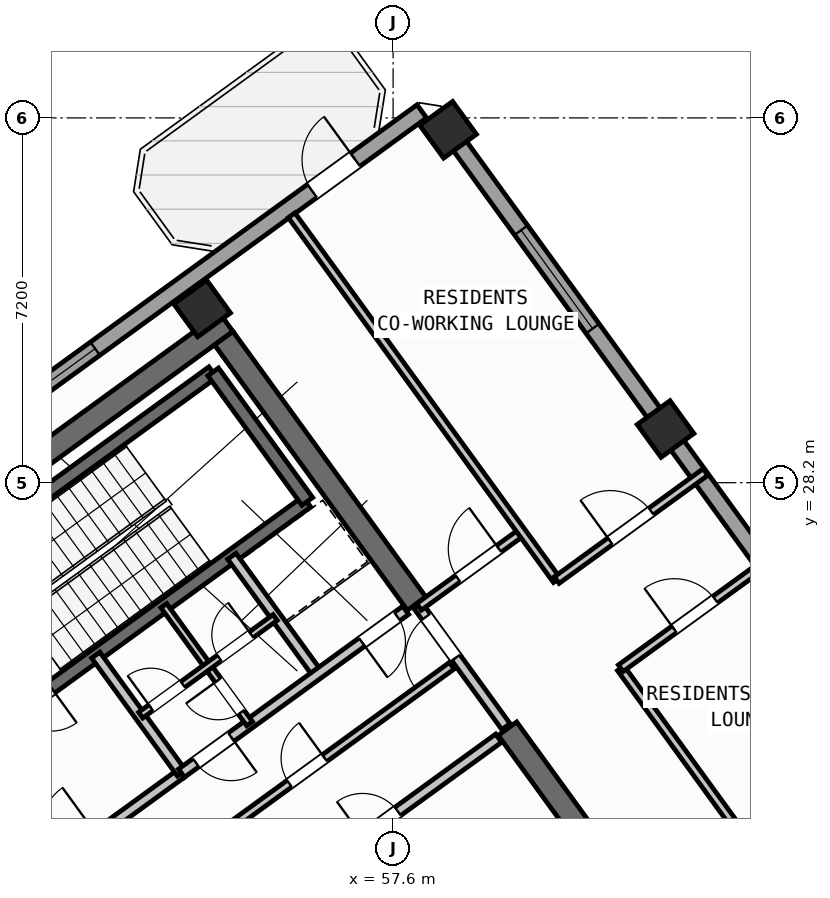
"""IFC4 building model, lengths in metres.
Left out: names, types, materials, properties, quantities, classifications, styles, units other than length and angle.
Written with IfcOpenShell. Run it as: python <this file> out.ifc"""

import sys

from ifc_helpers import new_model, si_unit, direction, frame, frame_2d, origin, origin_2d, place, context, subcontext, project, spatial, rectangle, hollow_rectangle, extrude, source, transform, mapped, element, fill, save


model = new_model("IFC4")
c1 = context("Model", 3, precision=1e-05, world=origin(), true_north=direction((0.0, 1.0)))
c2 = subcontext(c1, "Body", "Model", "MODEL_VIEW")
j1 = project(units=[si_unit("LENGTHUNIT", "METRE"), si_unit("PLANEANGLEUNIT", "RADIAN")], contexts=[c1])
p1 = place(None, origin())
s1 = spatial("IfcSite", under=j1, at=p1, CompositionType="ELEMENT")
p2 = place(p1, origin())
s2 = spatial("IfcBuilding", under=s1, at=p2, CompositionType="ELEMENT")
p3 = place(p2, frame((0.0, 0.0, 233.7)))
s3 = spatial("IfcBuildingStorey", under=s2, at=p3, CompositionType="ELEMENT", Elevation=233.7)
p4 = place(p3, frame((44.406, 24.172, 0.0), z_axis=(0.0, 0.0, 1.0), x_axis=(0.809012867805, 0.587790931986, 0.0)))
e1 = element("IfcWall", 1, at=p4, inside=s3, PredefinedType="SHEAR", context=c2, shape_type="SweptSolid", body=[
    extrude(rectangle(XDim=12.24, YDim=0.45, at=frame_2d((6.12, 0.0))), origin(), (0.0, 0.0, 1.0), 4.55),
])
p5 = place(p3, frame((61.988, 20.413, 0.0), z_axis=(0.0, 0.0, 1.0), x_axis=(-0.587819244441, 0.808992296542, 0.0)))
e2 = element("IfcWall", 2, at=p5, inside=s3, PredefinedType="SHEAR", context=c2, shape_type="SweptSolid", body=[
    extrude(rectangle(XDim=3.625, YDim=0.45, at=frame_2d((1.812, 0.0))), origin(), (0.0, 0.0, 1.0), 4.55),
])
p6 = place(p3, frame((58.064, 25.813, 0.0), z_axis=(0.0, 0.0, 1.0), x_axis=(-0.587774812919, 0.809024578921, 0.0)))
e3 = element("IfcWall", 3, at=p6, inside=s3, PredefinedType="SHEAR", context=c2, shape_type="SweptSolid", body=[
    extrude(rectangle(XDim=6.475, YDim=0.45, at=frame_2d((3.238, 0.0))), origin(), (0.0, 0.0, 1.0), 4.55),
])
m1 = source(origin(), c2, "Body", "SweptSolid", [
    extrude(hollow_rectangle(XDim=0.8, YDim=0.8, WallThickness=0.032, at=origin_2d()), origin(), (0.0, 0.0, 1.0), 4.8),
])
for number, where, z_axis, x_axis in (
    (4, (53.832, 31.638, 0.0), (0.0, 0.0, 1.0), (0.809, 0.588, 0.0)),
    (5, (62.977, 29.259, 0.0), (0.0, 0.0, 1.0), (0.809, 0.588, 0.0)),
    (6, (58.686, 35.165, 0.0), (0.0, 0.0, 1.0), (0.809, 0.588, 0.0)),
):
    element("IfcColumn", number, at=place(p3, frame(where, z_axis=z_axis, x_axis=x_axis)), inside=s3, PredefinedType="COLUMN", context=c2, shape_type="MappedRepresentation", body=[
        mapped(m1, transform((0.0, 0.0, 0.0), scale=1.0)),
    ])
p7 = place(p3, frame((43.938, 25.192, 0.0), z_axis=(0.0, 0.0, 1.0), x_axis=(0.809016324578, 0.587786174187, 0.0)))
e7 = element("IfcWall", 7, at=p7, inside=s3, PredefinedType="STANDARD", context=c2, shape_type="SweptSolid", body=[
    extrude(rectangle(XDim=17.587, YDim=0.32, at=frame_2d((8.794, 0.0))), origin(), (0.0, 0.0, 1.0), 4.55),
])
p8 = place(p7, frame((14.914, 0.0, 0.0)))
e8 = element("IfcOpeningElement", 8, at=p8, cuts=e7, PredefinedType="OPENING", context=c2, shape_type="SweptSolid", body=[
    extrude(rectangle(XDim=1.05, YDim=2.15, at=frame_2d((0.525, 1.075))), frame((0.0, 0.17, 0.0), z_axis=(0.0, -1.0, 0.0), x_axis=(1.0, 0.0, 0.0)), (0.0, 0.0, 1.0), 0.34),
])
p9 = place(p7, frame((1.969, 0.0, 0.75)))
e9 = element("IfcOpeningElement", 9, at=p9, cuts=e7, PredefinedType="OPENING", context=c2, shape_type="SweptSolid", body=[
    extrude(rectangle(XDim=2.4, YDim=1.6, at=frame_2d((1.2, 0.8))), frame((0.0, 0.17, 0.0), z_axis=(0.0, -1.0, 0.0), x_axis=(1.0, 0.0, 0.0)), (0.0, 0.0, 1.0), 0.34),
])
p10 = place(p7, frame((7.219, 0.0, 0.75)))
e10 = element("IfcOpeningElement", 10, at=p10, cuts=e7, PredefinedType="OPENING", context=c2, shape_type="SweptSolid", body=[
    extrude(rectangle(XDim=2.4, YDim=1.6, at=frame_2d((1.2, 0.8))), frame((0.0, 0.17, 0.0), z_axis=(0.0, -1.0, 0.0), x_axis=(1.0, 0.0, 0.0)), (0.0, 0.0, 1.0), 0.34),
])
p11 = place(p3, frame((58.455, 35.484, 0.0), z_axis=(0.0, 0.0, 1.0), x_axis=(0.587783625747, -0.809018176127, 0.0)))
e11 = element("IfcWall", 11, at=p11, inside=s3, PredefinedType="STANDARD", context=c2, shape_type="SweptSolid", body=[
    extrude(rectangle(XDim=21.587, YDim=0.32, at=frame_2d((10.794, 0.0))), origin(), (0.0, 0.0, 1.0), 4.075),
])
p12 = place(p11, frame((2.844, 0.0, 0.75)))
e12 = element("IfcOpeningElement", 12, at=p12, cuts=e11, PredefinedType="OPENING", context=c2, shape_type="SweptSolid", body=[
    extrude(rectangle(XDim=2.4, YDim=1.6, at=frame_2d((1.2, 0.8))), frame((0.0, 0.17, 0.0), z_axis=(0.0, -1.0, 0.0), x_axis=(1.0, 0.0, 0.0)), (0.0, 0.0, 1.0), 0.34),
])
p13 = place(p11, frame((11.967, 0.0, 0.85)))
e13 = element("IfcOpeningElement", 13, at=p13, cuts=e11, PredefinedType="OPENING", context=c2, shape_type="SweptSolid", body=[
    extrude(rectangle(XDim=1.8, YDim=1.5, at=frame_2d((0.9, 0.75))), frame((0.0, 0.17, 0.0), z_axis=(0.0, -1.0, 0.0), x_axis=(1.0, 0.0, 0.0)), (0.0, 0.0, 1.0), 0.34),
])
p14 = place(p3, frame((48.006, 25.996, 0.0), z_axis=(0.0, 0.0, 1.0), x_axis=(0.80901903764, 0.587782439969, 0.0)))
e14 = element("IfcWall", 14, at=p14, inside=s3, PredefinedType="SHEAR", context=c2, shape_type="SweptSolid", body=[
    extrude(rectangle(XDim=7.46, YDim=0.26, at=frame_2d((3.73, 0.0))), origin(), (0.0, 0.0, 1.0), 4.55),
])
p15 = place(p3, frame((49.863, 23.44, 0.0), z_axis=(0.0, 0.0, 1.0), x_axis=(0.809003474932, 0.587803859759, 0.0)))
e15 = element("IfcWall", 15, at=p15, inside=s3, PredefinedType="SHEAR", context=c2, shape_type="SweptSolid", body=[
    extrude(rectangle(XDim=7.46, YDim=0.26, at=frame_2d((3.73, 0.0))), origin(), (0.0, 0.0, 1.0), 4.55),
])
p16 = place(p15, frame((0.36, 0.0, 0.0)))
e16 = element("IfcOpeningElement", 16, at=p16, cuts=e15, PredefinedType="OPENING", context=c2, shape_type="SweptSolid", body=[
    extrude(rectangle(XDim=0.86, YDim=2.05, at=frame_2d((0.43, 1.025))), frame((0.0, 0.14, 0.0), z_axis=(0.0, -1.0, 0.0), x_axis=(1.0, 0.0, 0.0)), (0.0, 0.0, 1.0), 0.28),
])
p17 = place(p3, frame((55.906, 27.831, 0.0), z_axis=(0.0, 0.0, 1.0), x_axis=(-0.587804123638, 0.809003283204, 0.0)))
e17 = element("IfcWall", 17, at=p17, inside=s3, PredefinedType="SHEAR", context=c2, shape_type="SweptSolid", body=[
    extrude(rectangle(XDim=3.16, YDim=0.26, at=frame_2d((1.58, 0.0))), origin(), (0.0, 0.0, 1.0), 4.55),
])
p18 = place(p3, frame((48.718, 19.048, 0.0), z_axis=(0.0, 0.0, 1.0), x_axis=(0.809017261719, 0.587784884325, 0.0)))
e18 = element("IfcWall", 18, at=p18, inside=s3, PredefinedType="STANDARD", context=c2, shape_type="SweptSolid", body=[
    extrude(rectangle(XDim=5.818, YDim=0.2, at=frame_2d((2.909, 0.0))), origin(), (0.0, 0.0, 1.0), 4.54),
])
p19 = place(p18, frame((2.598, 0.0, 0.0)))
e19 = element("IfcOpeningElement", 19, at=p19, cuts=e18, PredefinedType="OPENING", context=c2, shape_type="SweptSolid", body=[
    extrude(rectangle(XDim=1.15, YDim=2.1, at=frame_2d((0.575, 1.05))), frame((0.0, 0.11, 0.0), z_axis=(0.0, -1.0, 0.0), x_axis=(1.0, 0.0, 0.0)), (0.0, 0.0, 1.0), 0.22),
])
p20 = place(p3, frame((56.553, 20.884, 0.0), z_axis=(0.0, 0.0, 1.0), x_axis=(0.809041669066, 0.587751288995, 0.0)))
e20 = element("IfcWall", 20, at=p20, inside=s3, PredefinedType="STANDARD", context=c2, shape_type="SweptSolid", body=[
    extrude(rectangle(XDim=3.868, YDim=0.2, at=frame_2d((1.934, 0.0))), origin(), (0.0, 0.0, 1.0), 4.54),
])
p21 = place(p20, frame((0.55, 0.0, 0.0)))
e21 = element("IfcOpeningElement", 21, at=p21, cuts=e20, PredefinedType="OPENING", context=c2, shape_type="SweptSolid", body=[
    extrude(rectangle(XDim=0.86, YDim=2.05, at=frame_2d((0.43, 1.025))), frame((0.0, 0.11, 0.0), z_axis=(0.0, -1.0, 0.0), x_axis=(1.0, 0.0, 0.0)), (0.0, 0.0, 1.0), 0.22),
])
p22 = place(p3, frame((54.421, 21.436, 0.0), z_axis=(0.0, 0.0, 1.0), x_axis=(0.809013710463, 0.587789772183, 0.0)))
e22 = element("IfcWall", 22, at=p22, inside=s3, PredefinedType="PARTITIONING", context=c2, shape_type="SweptSolid", body=[
    extrude(rectangle(XDim=5.36, YDim=0.16, at=frame_2d((2.68, 0.0))), origin(), (0.0, 0.0, 1.0), 4.54),
])
p23 = place(p22, frame((1.4, 0.0, 0.0)))
e23 = element("IfcOpeningElement", 23, at=p23, cuts=e22, PredefinedType="OPENING", context=c2, shape_type="SweptSolid", body=[
    extrude(rectangle(XDim=0.86, YDim=2.05, at=frame_2d((0.43, 1.025))), frame((0.0, 0.09, 0.0), z_axis=(0.0, -1.0, 0.0), x_axis=(1.0, 0.0, 0.0)), (0.0, 0.0, 1.0), 0.18),
])
p24 = place(p3, frame((53.425, 22.468, 0.0), z_axis=(0.0, 0.0, 1.0), x_axis=(-0.5877230039, 0.809062216821, 0.0)))
e24 = element("IfcWall", 24, at=p24, inside=s3, PredefinedType="STANDARD", context=c2, shape_type="SweptSolid", body=[
    extrude(rectangle(XDim=2.88, YDim=0.2, at=frame_2d((1.44, 0.0))), origin(), (0.0, 0.0, 1.0), 4.54),
])
p25 = place(p3, frame((56.111, 24.419, 0.0), z_axis=(0.0, 0.0, 1.0), x_axis=(-0.58777848983, 0.809021907548, 0.0)))
e25 = element("IfcWall", 25, at=p25, inside=s3, PredefinedType="STANDARD", context=c2, shape_type="SweptSolid", body=[
    extrude(rectangle(XDim=2.88, YDim=0.2, at=frame_2d((1.44, 0.0))), origin(), (0.0, 0.0, 1.0), 4.54),
])
p26 = place(p3, frame((53.425, 22.468, 0.0), z_axis=(0.0, 0.0, 1.0), x_axis=(0.809015945709, 0.587786695655, 0.0)))
e26 = element("IfcWall", 26, at=p26, inside=s3, PredefinedType="STANDARD", context=c2, shape_type="SweptSolid", body=[
    extrude(rectangle(XDim=5.468, YDim=0.2, at=frame_2d((2.734, 0.0))), origin(), (0.0, 0.0, 1.0), 4.54),
])
p27 = place(p26, frame((4.4, 0.0, 0.0)))
e27 = element("IfcOpeningElement", 27, at=p27, cuts=e26, PredefinedType="OPENING", context=c2, shape_type="SweptSolid", body=[
    extrude(rectangle(XDim=0.86, YDim=2.05, at=frame_2d((0.43, 1.025))), frame((0.0, 0.11, 0.0), z_axis=(0.0, -1.0, 0.0), x_axis=(1.0, 0.0, 0.0)), (0.0, 0.0, 1.0), 0.22),
])
p28 = place(p26, frame((0.35, 0.0, 0.0)))
e28 = element("IfcOpeningElement", 28, at=p28, cuts=e26, PredefinedType="OPENING", context=c2, shape_type="SweptSolid", body=[
    extrude(rectangle(XDim=0.86, YDim=2.05, at=frame_2d((0.43, 1.025))), frame((0.0, 0.11, 0.0), z_axis=(0.0, -1.0, 0.0), x_axis=(1.0, 0.0, 0.0)), (0.0, 0.0, 1.0), 0.22),
])
p29 = place(p3, frame((54.768, 23.443, 0.0), z_axis=(0.0, 0.0, 1.0), x_axis=(-0.587736077749, 0.809052719489, 0.0)))
e29 = element("IfcWall", 29, at=p29, inside=s3, PredefinedType="PLUMBINGWALL", context=c2, shape_type="SweptSolid", body=[
    extrude(rectangle(XDim=1.4, YDim=0.14, at=frame_2d((0.7, 0.0))), origin(), (0.0, 0.0, 1.0), 4.54),
])
p30 = place(p29, frame((0.28, 0.0, 0.0)))
e30 = element("IfcOpeningElement", 30, at=p30, cuts=e29, PredefinedType="OPENING", context=c2, shape_type="SweptSolid", body=[
    extrude(rectangle(XDim=0.78, YDim=2.05, at=frame_2d((0.39, 1.025))), frame((0.0, 0.08, 0.0), z_axis=(0.0, -1.0, 0.0), x_axis=(1.0, 0.0, 0.0)), (0.0, 0.0, 1.0), 0.16),
])
p31 = place(p3, frame((53.945, 24.576, 0.0), z_axis=(0.0, 0.0, 1.0), x_axis=(-0.587897037186, 0.808935766095, 0.0)))
e31 = element("IfcWall", 31, at=p31, inside=s3, PredefinedType="PLUMBINGWALL", context=c2, shape_type="SweptSolid", body=[
    extrude(rectangle(XDim=1.48, YDim=0.14, at=frame_2d((0.74, 0.0))), origin(), (0.0, 0.0, 1.0), 4.54),
])
p32 = place(p3, frame((52.618, 23.612, 0.0), z_axis=(0.0, 0.0, 1.0), x_axis=(0.809009587469, 0.587795446889, 0.0)))
e32 = element("IfcWall", 32, at=p32, inside=s3, PredefinedType="PLUMBINGWALL", context=c2, shape_type="SweptSolid", body=[
    extrude(rectangle(XDim=3.28, YDim=0.14, at=frame_2d((1.64, 0.0))), origin(), (0.0, 0.0, 1.0), 4.54),
])
p33 = place(p32, frame((0.25, 0.0, 0.0)))
e33 = element("IfcOpeningElement", 33, at=p33, cuts=e32, PredefinedType="OPENING", context=c2, shape_type="SweptSolid", body=[
    extrude(rectangle(XDim=0.78, YDim=2.05, at=frame_2d((0.39, 1.025))), frame((0.0, 0.08, 0.0), z_axis=(0.0, -1.0, 0.0), x_axis=(1.0, 0.0, 0.0)), (0.0, 0.0, 1.0), 0.16),
])
p34 = place(p32, frame((1.92, 0.0, 0.0)))
e34 = element("IfcOpeningElement", 34, at=p34, cuts=e32, PredefinedType="OPENING", context=c2, shape_type="SweptSolid", body=[
    extrude(rectangle(XDim=0.78, YDim=2.05, at=frame_2d((0.39, 1.025))), frame((0.0, 0.08, 0.0), z_axis=(0.0, -1.0, 0.0), x_axis=(1.0, 0.0, 0.0)), (0.0, 0.0, 1.0), 0.16),
])
p35 = place(p3, frame((59.827, 23.386, 0.0), z_axis=(0.0, 0.0, 1.0), x_axis=(-0.587803840107, 0.809003489211, 0.0)))
e35 = element("IfcWall", 35, at=p35, inside=s3, PredefinedType="STANDARD", context=c2, shape_type="SweptSolid", body=[
    extrude(rectangle(XDim=2.96, YDim=0.2, at=frame_2d((1.48, 0.0))), origin(), (0.0, 0.0, 1.0), 4.54),
])
p36 = place(p35, frame((1.68, 0.0, 0.0)))
e36 = element("IfcOpeningElement", 36, at=p36, cuts=e35, PredefinedType="OPENING", context=c2, shape_type="SweptSolid", body=[
    extrude(rectangle(XDim=1.0, YDim=2.1, at=frame_2d((0.5, 1.05))), frame((0.0, 0.11, 0.0), z_axis=(0.0, -1.0, 0.0), x_axis=(1.0, 0.0, 0.0)), (0.0, 0.0, 1.0), 0.22),
])
p37 = place(p3, frame((58.111, 25.749, 0.0), z_axis=(0.0, 0.0, 1.0), x_axis=(0.809000999347, 0.58780726693, 0.0)))
e37 = element("IfcWall", 37, at=p37, inside=s3, PredefinedType="PARTITIONING", context=c2, shape_type="SweptSolid", body=[
    extrude(rectangle(XDim=2.51, YDim=0.16, at=frame_2d((1.255, 0.0))), origin(), (0.0, 0.0, 1.0), 4.075),
])
p38 = place(p37, frame((0.95, 0.0, 0.0)))
e38 = element("IfcOpeningElement", 38, at=p38, cuts=e37, PredefinedType="OPENING", context=c2, shape_type="SweptSolid", body=[
    extrude(rectangle(XDim=1.0, YDim=2.1, at=frame_2d((0.5, 1.05))), frame((0.0, 0.09, 0.0), z_axis=(0.0, -1.0, 0.0), x_axis=(1.0, 0.0, 0.0)), (0.0, 0.0, 1.0), 0.18),
])
p39 = place(p3, frame((68.353, 15.922, 0.0), z_axis=(0.0, 0.0, 1.0), x_axis=(-0.587783168305, 0.809018508476, 0.0)))
e39 = element("IfcWall", 39, at=p39, inside=s3, PredefinedType="PARTITIONING", context=c2, shape_type="SweptSolid", body=[
    extrude(rectangle(XDim=10.65, YDim=0.16, at=frame_2d((5.325, 0.0))), origin(), (0.0, 0.0, 1.0), 4.54),
])
p40 = place(p3, frame((60.829, 26.278, 0.0), z_axis=(0.0, 0.0, 1.0), x_axis=(-0.587781800813, 0.80901950201, 0.0)))
e40 = element("IfcWall", 40, at=p40, inside=s3, PredefinedType="PARTITIONING", context=c2, shape_type="SweptSolid", body=[
    extrude(rectangle(XDim=8.9, YDim=0.16, at=frame_2d((4.45, 0.0))), origin(), (0.0, 0.0, 1.0), 4.54),
])
p41 = place(p3, frame((62.093, 24.538, 0.0), z_axis=(0.0, 0.0, 1.0), x_axis=(0.809035546126, 0.58775971715, 0.0)))
e41 = element("IfcWall", 41, at=p41, inside=s3, PredefinedType="PARTITIONING", context=c2, shape_type="SweptSolid", body=[
    extrude(rectangle(XDim=3.63, YDim=0.16, at=frame_2d((1.815, 0.0))), origin(), (0.0, 0.0, 1.0), 4.54),
])
p42 = place(p41, frame((1.305, 0.0, 0.0)))
e42 = element("IfcOpeningElement", 42, at=p42, cuts=e41, PredefinedType="OPENING", context=c2, shape_type="SweptSolid", body=[
    extrude(rectangle(XDim=1.0, YDim=2.1, at=frame_2d((0.5, 1.05))), frame((0.0, 0.09, 0.0), z_axis=(0.0, -1.0, 0.0), x_axis=(1.0, 0.0, 0.0)), (0.0, 0.0, 1.0), 0.18),
])
p43 = place(p3, frame((60.829, 26.278, 0.0), z_axis=(0.0, 0.0, 1.0), x_axis=(0.809003564202, 0.587803736896, 0.0)))
e43 = element("IfcWall", 43, at=p43, inside=s3, PredefinedType="PARTITIONING", context=c2, shape_type="SweptSolid", body=[
    extrude(rectangle(XDim=3.63, YDim=0.16, at=frame_2d((1.815, 0.0))), origin(), (0.0, 0.0, 1.0), 4.54),
])
p44 = place(p43, frame((1.305, 0.0, 0.0)))
e44 = element("IfcOpeningElement", 44, at=p44, cuts=e43, PredefinedType="OPENING", context=c2, shape_type="SweptSolid", body=[
    extrude(rectangle(XDim=1.0, YDim=2.1, at=frame_2d((0.5, 1.05))), frame((0.0, 0.09, 0.0), z_axis=(0.0, -1.0, 0.0), x_axis=(1.0, 0.0, 0.0)), (0.0, 0.0, 1.0), 0.18),
])
m2 = source(origin(), c2, "Body", "SweptSolid", [
    extrude(rectangle(XDim=1.05, YDim=2.15, at=frame_2d((0.525, 1.075))), frame((0.0, 0.025, 0.0), z_axis=(0.0, -1.0, 0.0), x_axis=(1.0, 0.0, 0.0)), (0.0, 0.0, 1.0), 0.05),
])
p45 = place(p8, origin())
e45 = element("IfcDoor", 45, at=p45, inside=s3, OperationType="SINGLE_SWING_RIGHT", PredefinedType="DOOR", context=c2, shape_type="MappedRepresentation", body=[
    mapped(m2, transform((0.0, 0.0, 0.0), scale=1.0)),
])
fill(e8, e45)
m3 = source(origin(), c2, "Body", "SweptSolid", [
    extrude(rectangle(XDim=2.4, YDim=1.6, at=frame_2d((1.2, 0.8))), frame((0.0, 0.03, 0.0), z_axis=(0.0, -1.0, 0.0), x_axis=(1.0, 0.0, 0.0)), (0.0, 0.0, 1.0), 0.06),
])
p46 = place(p10, origin())
e46 = element("IfcWindow", 46, at=p46, inside=s3, PartitioningType="SINGLE_PANEL", PredefinedType="WINDOW", context=c2, shape_type="MappedRepresentation", body=[
    mapped(m3, transform((0.0, 0.0, 0.0), scale=1.0)),
])
fill(e10, e46)
p47 = place(p12, origin())
e47 = element("IfcWindow", 47, at=p47, inside=s3, PartitioningType="SINGLE_PANEL", PredefinedType="WINDOW", context=c2, shape_type="MappedRepresentation", body=[
    mapped(m3, transform((0.0, 0.0, 0.0), scale=1.0)),
])
fill(e12, e47)
m4 = source(origin(), c2, "Body", "SweptSolid", [
    extrude(rectangle(XDim=0.86, YDim=2.05, at=frame_2d((0.43, 1.025))), frame((0.0, 0.025, 0.0), z_axis=(0.0, -1.0, 0.0), x_axis=(1.0, 0.0, 0.0)), (0.0, 0.0, 1.0), 0.05),
])
p48 = place(p23, origin())
e48 = element("IfcDoor", 48, at=p48, inside=s3, OperationType="SINGLE_SWING_RIGHT", PredefinedType="DOOR", context=c2, shape_type="MappedRepresentation", body=[
    mapped(m4, transform((0.0, 0.0, 0.0), scale=1.0)),
])
fill(e23, e48)
p49 = place(p21, origin())
e49 = element("IfcDoor", 49, at=p49, inside=s3, OperationType="SINGLE_SWING_LEFT", PredefinedType="DOOR", context=c2, shape_type="MappedRepresentation", body=[
    mapped(m4, transform((0.0, 0.0, 0.0), scale=1.0)),
])
fill(e21, e49)
p50 = place(p27, frame((0.86, 0.0, 0.0), z_axis=(0.0, 0.0, 1.0), x_axis=(-1.0, 0.0, 0.0)))
e50 = element("IfcDoor", 50, at=p50, inside=s3, OperationType="SINGLE_SWING_RIGHT", PredefinedType="DOOR", context=c2, shape_type="MappedRepresentation", body=[
    mapped(m4, transform((0.0, 0.0, 0.0), scale=1.0)),
])
fill(e27, e50)
p51 = place(p28, frame((0.86, 0.0, 0.0), z_axis=(0.0, 0.0, 1.0), x_axis=(-1.0, 0.0, 0.0)))
e51 = element("IfcDoor", 51, at=p51, inside=s3, OperationType="SINGLE_SWING_LEFT", PredefinedType="DOOR", context=c2, shape_type="MappedRepresentation", body=[
    mapped(m4, transform((0.0, 0.0, 0.0), scale=1.0)),
])
fill(e28, e51)
m5 = source(origin(), c2, "Body", "SweptSolid", [
    extrude(rectangle(XDim=0.78, YDim=2.05, at=frame_2d((0.39, 1.025))), frame((0.0, 0.025, 0.0), z_axis=(0.0, -1.0, 0.0), x_axis=(1.0, 0.0, 0.0)), (0.0, 0.0, 1.0), 0.05),
])
p52 = place(p30, origin())
e52 = element("IfcDoor", 52, at=p52, inside=s3, OperationType="SINGLE_SWING_RIGHT", PredefinedType="DOOR", context=c2, shape_type="MappedRepresentation", body=[
    mapped(m5, transform((0.0, 0.0, 0.0), scale=1.0)),
])
fill(e30, e52)
p53 = place(p33, origin())
e53 = element("IfcDoor", 53, at=p53, inside=s3, OperationType="SINGLE_SWING_LEFT", PredefinedType="DOOR", context=c2, shape_type="MappedRepresentation", body=[
    mapped(m5, transform((0.0, 0.0, 0.0), scale=1.0)),
])
fill(e33, e53)
p54 = place(p34, origin())
e54 = element("IfcDoor", 54, at=p54, inside=s3, OperationType="SINGLE_SWING_RIGHT", PredefinedType="DOOR", context=c2, shape_type="MappedRepresentation", body=[
    mapped(m5, transform((0.0, 0.0, 0.0), scale=1.0)),
])
fill(e34, e54)
m6 = source(origin(), c2, "Body", "SweptSolid", [
    extrude(rectangle(XDim=1.0, YDim=2.1, at=frame_2d((0.5, 1.05))), frame((0.0, 0.025, 0.0), z_axis=(0.0, -1.0, 0.0), x_axis=(1.0, 0.0, 0.0)), (0.0, 0.0, 1.0), 0.05),
])
p55 = place(p38, origin())
e55 = element("IfcDoor", 55, at=p55, inside=s3, OperationType="SINGLE_SWING_RIGHT", PredefinedType="DOOR", context=c2, shape_type="MappedRepresentation", body=[
    mapped(m6, transform((0.0, 0.0, 0.0), scale=1.0)),
])
fill(e38, e55)
p56 = place(p36, origin())
e56 = element("IfcDoor", 56, at=p56, inside=s3, OperationType="SINGLE_SWING_LEFT", PredefinedType="DOOR", context=c2, shape_type="MappedRepresentation", body=[
    mapped(m6, transform((0.0, 0.0, 0.0), scale=1.0)),
])
fill(e36, e56)
p57 = place(p44, origin())
e57 = element("IfcDoor", 57, at=p57, inside=s3, OperationType="SINGLE_SWING_LEFT", PredefinedType="DOOR", context=c2, shape_type="MappedRepresentation", body=[
    mapped(m6, transform((0.0, 0.0, 0.0), scale=1.0)),
])
fill(e44, e57)
p58 = place(p42, origin())
e58 = element("IfcDoor", 58, at=p58, inside=s3, OperationType="SINGLE_SWING_LEFT", PredefinedType="DOOR", context=c2, shape_type="MappedRepresentation", body=[
    mapped(m6, transform((0.0, 0.0, 0.0), scale=1.0)),
])
fill(e42, e58)
save(model, sys.argv[1])
